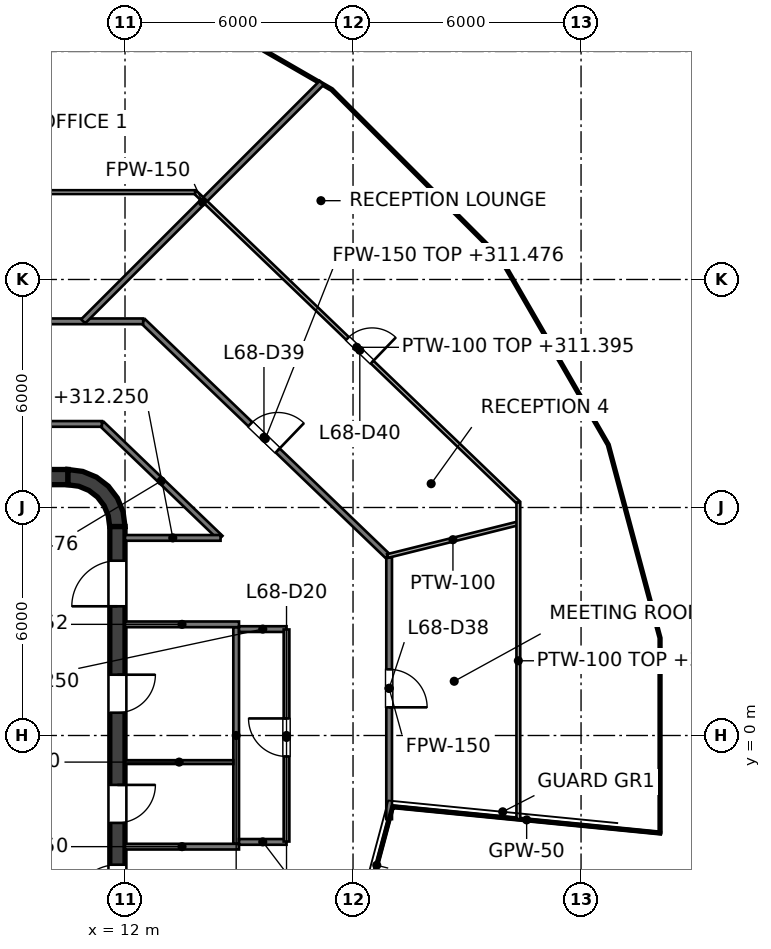
"""IFC4 building model, lengths in metres.
Left out: names, types, materials, properties, quantities, classifications, styles, units other than length and angle.
Written with IfcOpenShell. Run it as: python <this file> out.ifc"""

import sys

from ifc_helpers import new_model, si_unit, direction, frame, frame_2d, origin, place, context, subcontext, project, spatial, polyline, rectangle, outline, extrude, element, fill, save


model = new_model("IFC4")
c1 = context("Model", 3, precision=1e-05, world=origin(), true_north=direction((0.0, 1.0)))
c2 = subcontext(c1, "Body", "Model", "MODEL_VIEW")
j1 = project(units=[si_unit("LENGTHUNIT", "METRE"), si_unit("PLANEANGLEUNIT", "RADIAN")], contexts=[c1])
p1 = place(None, origin())
s1 = spatial("IfcSite", under=j1, at=p1, CompositionType="ELEMENT")
p2 = place(p1, origin())
s2 = spatial("IfcBuilding", under=s1, at=p2, CompositionType="ELEMENT")
p3 = place(p2, frame((0.0, 0.0, 308.4)))
s3 = spatial("IfcBuildingStorey", under=s2, at=p3, CompositionType="ELEMENT", Elevation=308.4)
p4 = place(p3, frame((-10.5, 6.8, 0.0), z_axis=(0.0, 0.0, 1.0), x_axis=(1.0, 0.0, 0.0)))
e1 = element("IfcWall", 1, at=p4, inside=s3, PredefinedType="SHEAR", context=c2, shape_type="SweptSolid", body=[
    extrude(rectangle(XDim=21.0, YDim=0.4, at=frame_2d((10.5, 0.0))), origin(), (0.0, 0.0, 1.0), 4.0),
])
p5 = place(p3, frame((11.8, -5.5, 0.0), z_axis=(0.0, 0.0, 1.0), x_axis=(0.0, 1.0, 0.0)))
e2 = element("IfcWall", 2, at=p5, inside=s3, PredefinedType="SHEAR", context=c2, shape_type="SweptSolid", body=[
    extrude(rectangle(XDim=11.0, YDim=0.4, at=frame_2d((5.5, 0.0))), origin(), (0.0, 0.0, 1.0), 4.0),
])
p6 = place(p5, frame((3.2, 0.0, 0.0)))
e3 = element("IfcOpeningElement", 3, at=p6, cuts=e2, PredefinedType="OPENING", context=c2, shape_type="SweptSolid", body=[
    extrude(rectangle(XDim=1.0, YDim=2.1, at=frame_2d((0.5, 1.05))), frame((0.0, 0.2, 0.0), z_axis=(0.0, -1.0, 0.0), x_axis=(1.0, 0.0, 0.0)), (0.0, 0.0, 1.0), 0.4),
])
p7 = place(p5, frame((6.1, 0.0, 0.0)))
e4 = element("IfcOpeningElement", 4, at=p7, cuts=e2, PredefinedType="OPENING", context=c2, shape_type="SweptSolid", body=[
    extrude(rectangle(XDim=1.0, YDim=2.1, at=frame_2d((0.5, 1.05))), frame((0.0, 0.2, 0.0), z_axis=(0.0, -1.0, 0.0), x_axis=(1.0, 0.0, 0.0)), (0.0, 0.0, 1.0), 0.4),
])
p8 = place(p5, frame((0.9, 0.0, 0.0)))
e5 = element("IfcOpeningElement", 5, at=p8, cuts=e2, PredefinedType="OPENING", context=c2, shape_type="SweptSolid", body=[
    extrude(rectangle(XDim=1.2, YDim=2.1, at=frame_2d((0.6, 1.05))), frame((0.0, 0.2, 0.0), z_axis=(0.0, -1.0, 0.0), x_axis=(1.0, 0.0, 0.0)), (0.0, 0.0, 1.0), 0.4),
])
p9 = place(p5, frame((8.9, 0.0, 0.0)))
e6 = element("IfcOpeningElement", 6, at=p9, cuts=e2, PredefinedType="OPENING", context=c2, shape_type="SweptSolid", body=[
    extrude(rectangle(XDim=1.2, YDim=2.1, at=frame_2d((0.6, 1.05))), frame((0.0, 0.2, 0.0), z_axis=(0.0, -1.0, 0.0), x_axis=(1.0, 0.0, 0.0)), (0.0, 0.0, 1.0), 0.4),
])
p10 = place(p3, origin())
e7 = element("IfcWall", 7, at=p10, inside=s3, PredefinedType="SHEAR", context=c2, shape_type="SweptSolid", body=[
    extrude(outline(polyline([(10.5, 7.0), (10.5, 6.596), (10.784, 6.559), (11.048, 6.45), (11.275, 6.275), (11.45, 6.048), (11.559, 5.784), (11.596, 5.5), (12.0, 5.5), (11.949, 5.888), (11.799, 6.25), (11.561, 6.561), (11.25, 6.799), (10.888, 6.949), (10.5, 7.0)])), origin(), (0.0, 0.0, 1.0), 4.0),
])
p11 = place(p3, frame((14.925, -2.85, 0.0), z_axis=(0.0, 0.0, 1.0), x_axis=(0.0, 1.0, 0.0)))
e8 = element("IfcWall", 8, at=p11, inside=s3, PredefinedType="PARTITIONING", context=c2, shape_type="SweptSolid", body=[
    extrude(rectangle(XDim=5.7, YDim=0.15, at=frame_2d((2.85, 0.0))), origin(), (0.0, 0.0, 1.0), 2.995),
])
p12 = place(p3, frame((12.0, 2.925, 0.0), z_axis=(0.0, 0.0, 1.0), x_axis=(1.0, 0.0, 0.0)))
e9 = element("IfcWall", 9, at=p12, inside=s3, PredefinedType="PARTITIONING", context=c2, shape_type="SweptSolid", body=[
    extrude(rectangle(XDim=3.0, YDim=0.15, at=frame_2d((1.5, 0.0))), origin(), (0.0, 0.0, 1.0), 3.152),
])
p13 = place(p3, frame((12.0, -2.925, 0.0), z_axis=(0.0, 0.0, 1.0), x_axis=(1.0, 0.0, 0.0)))
e10 = element("IfcWall", 10, at=p13, inside=s3, PredefinedType="PARTITIONING", context=c2, shape_type="SweptSolid", body=[
    extrude(rectangle(XDim=3.0, YDim=0.15, at=frame_2d((1.5, 0.0))), origin(), (0.0, 0.0, 1.0), 3.85),
])
p14 = place(p3, frame((12.0, -0.7, 0.0), z_axis=(0.0, 0.0, 1.0), x_axis=(1.0, 0.0, 0.0)))
e11 = element("IfcWall", 11, at=p14, inside=s3, PredefinedType="PARTITIONING", context=c2, shape_type="SweptSolid", body=[
    extrude(rectangle(XDim=2.85, YDim=0.1, at=frame_2d((1.425, 0.0))), origin(), (0.0, 0.0, 1.0), 3.85),
])
p15 = place(p3, frame((11.391, 8.199, 0.0), z_axis=(0.0, 0.0, 1.0), x_axis=(0.721228427004, -0.692697304803, 0.0)))
e12 = element("IfcWall", 12, at=p15, inside=s3, PredefinedType="PARTITIONING", context=c2, shape_type="SweptSolid", body=[
    extrude(rectangle(XDim=4.33, YDim=0.15, at=frame_2d((2.165, 0.0))), origin(), (0.0, 0.0, 1.0), 3.076),
])
p16 = place(p3, frame((12.478, 10.899, 0.0), z_axis=(0.0, 0.0, 1.0), x_axis=(0.72124338483, -0.692681730551, 0.0)))
e13 = element("IfcWall", 13, at=p16, inside=s3, PredefinedType="PARTITIONING", context=c2, shape_type="SweptSolid", body=[
    extrude(rectangle(XDim=8.915, YDim=0.15, at=frame_2d((4.458, 0.0))), origin(), (0.0, 0.0, 1.0), 3.076),
])
p17 = place(p16, frame((3.907, 0.0, 0.0)))
e14 = element("IfcOpeningElement", 14, at=p17, cuts=e13, PredefinedType="OPENING", context=c2, shape_type="SweptSolid", body=[
    extrude(rectangle(XDim=1.0, YDim=2.1, at=frame_2d((0.5, 1.05))), frame((0.0, 0.075, 0.0), z_axis=(0.0, -1.0, 0.0), x_axis=(1.0, 0.0, 0.0)), (0.0, 0.0, 1.0), 0.15),
])
for number, where, z_axis, x_axis in (
    (15, (15.0, -2.8, 0.0), (0.0, 0.0, 1.0), (1.0, 0.0, 0.0)),
    (16, (15.0, 2.8, 0.0), (0.0, 0.0, 1.0), (1.0, 0.0, 0.0)),
):
    element("IfcWall", number, at=place(p3, frame(where, z_axis=z_axis, x_axis=x_axis)), inside=s3, PredefinedType="PARTITIONING", context=c2, shape_type="SweptSolid", body=[
        extrude(rectangle(XDim=1.25, YDim=0.15, at=frame_2d((0.625, 0.0))), origin(), (0.0, 0.0, 1.0), 3.85),
    ])
p18 = place(p3, frame((12.0, 5.2, 0.0), z_axis=(0.0, 0.0, 1.0), x_axis=(1.0, 0.0, 0.0)))
e17 = element("IfcWall", 17, at=p18, inside=s3, PredefinedType="PARTITIONING", context=c2, shape_type="SweptSolid", body=[
    extrude(rectangle(XDim=2.514, YDim=0.15, at=frame_2d((1.257, 0.0))), origin(), (0.0, 0.0, 1.0), 3.85),
])
p19 = place(p3, frame((-11.391, 8.199, 0.0), z_axis=(0.0, 0.0, 1.0), x_axis=(1.0, 0.0, 0.0)))
e18 = element("IfcWall", 18, at=p19, inside=s3, PredefinedType="PARTITIONING", context=c2, shape_type="SweptSolid", body=[
    extrude(rectangle(XDim=22.782, YDim=0.15, at=frame_2d((11.391, 0.0))), origin(), (0.0, 0.0, 1.0), 2.927),
])
p20 = place(p19, frame((16.536, 0.0, 0.0)))
e19 = element("IfcOpeningElement", 19, at=p20, cuts=e18, PredefinedType="OPENING", context=c2, shape_type="SweptSolid", body=[
    extrude(rectangle(XDim=1.0, YDim=2.1, at=frame_2d((0.5, 1.05))), frame((0.0, 0.075, 0.0), z_axis=(0.0, -1.0, 0.0), x_axis=(1.0, 0.0, 0.0)), (0.0, 0.0, 1.0), 0.15),
])
p21 = place(p19, frame((5.145, 0.0, 0.0)))
e20 = element("IfcOpeningElement", 20, at=p21, cuts=e18, PredefinedType="OPENING", context=c2, shape_type="SweptSolid", body=[
    extrude(rectangle(XDim=1.0, YDim=2.1, at=frame_2d((0.5, 1.05))), frame((0.0, 0.075, 0.0), z_axis=(0.0, -1.0, 0.0), x_axis=(1.0, 0.0, 0.0)), (0.0, 0.0, 1.0), 0.15),
])
p22 = place(p3, frame((-12.478, 10.899, 0.0), z_axis=(0.0, 0.0, 1.0), x_axis=(1.0, 0.0, 0.0)))
e21 = element("IfcWall", 21, at=p22, inside=s3, PredefinedType="PARTITIONING", context=c2, shape_type="SweptSolid", body=[
    extrude(rectangle(XDim=24.956, YDim=0.15, at=frame_2d((12.478, 0.0))), origin(), (0.0, 0.0, 1.0), 2.927),
])
p23 = place(p22, frame((19.856, 0.0, 0.0)))
e22 = element("IfcOpeningElement", 22, at=p23, cuts=e21, PredefinedType="OPENING", context=c2, shape_type="SweptSolid", body=[
    extrude(rectangle(XDim=1.0, YDim=2.1, at=frame_2d((0.5, 1.05))), frame((0.0, 0.075, 0.0), z_axis=(0.0, -1.0, 0.0), x_axis=(1.0, 0.0, 0.0)), (0.0, 0.0, 1.0), 0.15),
])
p24 = place(p22, frame((14.508, 0.0, 0.0)))
e23 = element("IfcOpeningElement", 23, at=p24, cuts=e21, PredefinedType="OPENING", context=c2, shape_type="SweptSolid", body=[
    extrude(rectangle(XDim=1.0, YDim=2.1, at=frame_2d((0.5, 1.05))), frame((0.0, 0.075, 0.0), z_axis=(0.0, -1.0, 0.0), x_axis=(1.0, 0.0, 0.0)), (0.0, 0.0, 1.0), 0.15),
])
p25 = place(p22, frame((9.085, 0.0, 0.0)))
e24 = element("IfcOpeningElement", 24, at=p25, cuts=e21, PredefinedType="OPENING", context=c2, shape_type="SweptSolid", body=[
    extrude(rectangle(XDim=1.0, YDim=2.1, at=frame_2d((0.5, 1.05))), frame((0.0, 0.075, 0.0), z_axis=(0.0, -1.0, 0.0), x_axis=(1.0, 0.0, 0.0)), (0.0, 0.0, 1.0), 0.15),
])
p26 = place(p22, frame((4.343, 0.0, 0.0)))
e25 = element("IfcOpeningElement", 25, at=p26, cuts=e21, PredefinedType="OPENING", context=c2, shape_type="SweptSolid", body=[
    extrude(rectangle(XDim=1.0, YDim=2.1, at=frame_2d((0.5, 1.05))), frame((0.0, 0.075, 0.0), z_axis=(0.0, -1.0, 0.0), x_axis=(1.0, 0.0, 0.0)), (0.0, 0.0, 1.0), 0.15),
])
p27 = place(p3, frame((10.899, 10.899, 0.0), z_axis=(0.0, 0.0, 1.0), x_axis=(0.707106781187, 0.707106781187, 0.0)))
e26 = element("IfcWall", 26, at=p27, inside=s3, PredefinedType="PARTITIONING", context=c2, shape_type="SweptSolid", body=[
    extrude(rectangle(XDim=8.875, YDim=0.15, at=frame_2d((4.437, 0.0))), origin(), (0.0, 0.0, 1.0), 2.995),
])
p28 = place(p3, frame((18.95, -2.201, 0.0), z_axis=(0.0, 0.0, 1.0), x_axis=(0.0, 1.0, 0.0)))
e27 = element("IfcWall", 27, at=p28, inside=s3, PredefinedType="PARTITIONING", context=c2, shape_type="SweptSolid", body=[
    extrude(rectangle(XDim=6.884, YDim=0.15, at=frame_2d((3.442, 0.0))), origin(), (0.0, 0.0, 1.0), 2.995),
])
p29 = place(p28, frame((2.942, 0.0, 0.0)))
e28 = element("IfcOpeningElement", 28, at=p29, cuts=e27, PredefinedType="OPENING", context=c2, shape_type="SweptSolid", body=[
    extrude(rectangle(XDim=1.0, YDim=2.1, at=frame_2d((0.5, 1.05))), frame((0.0, 0.075, 0.0), z_axis=(0.0, -1.0, 0.0), x_axis=(1.0, 0.0, 0.0)), (0.0, 0.0, 1.0), 0.15),
])
p30 = place(p3, frame((16.25, -2.79, 0.0), z_axis=(0.0, 0.0, 1.0), x_axis=(0.0, 1.0, 0.0)))
e29 = element("IfcWall", 29, at=p30, inside=s3, PredefinedType="PARTITIONING", context=c2, shape_type="SweptSolid", body=[
    extrude(rectangle(XDim=5.58, YDim=0.15, at=frame_2d((2.79, 0.0))), origin(), (0.0, 0.0, 1.0), 2.995),
])
p31 = place(p30, frame((2.239, 0.0, 0.0)))
e30 = element("IfcOpeningElement", 30, at=p31, cuts=e29, PredefinedType="OPENING", context=c2, shape_type="SweptSolid", body=[
    extrude(rectangle(XDim=1.0, YDim=2.1, at=frame_2d((0.5, 1.05))), frame((0.0, 0.075, 0.0), z_axis=(0.0, -1.0, 0.0), x_axis=(1.0, 0.0, 0.0)), (0.0, 0.0, 1.0), 0.15),
])
p32 = place(p3, frame((19.038, -1.873, 0.0), z_axis=(0.0, 0.0, 1.0), x_axis=(0.995189989424, -0.097963691995, 0.0)))
e31 = element("IfcWall", 31, at=p32, inside=s3, PredefinedType="PARTITIONING", context=c2, shape_type="SweptSolid", body=[
    extrude(rectangle(XDim=7.095, YDim=0.05, at=frame_2d((3.548, 0.0))), origin(), (0.0, 0.0, 1.0), 2.995),
])
p33 = place(p3, frame((18.212, -4.956, 0.0), z_axis=(0.0, 0.0, 1.0), x_axis=(0.258862263765, 0.965914244847, 0.0)))
e32 = element("IfcWall", 32, at=p33, inside=s3, PredefinedType="PARTITIONING", context=c2, shape_type="SweptSolid", body=[
    extrude(rectangle(XDim=3.192, YDim=0.05, at=frame_2d((1.596, 0.0))), origin(), (0.0, 0.0, 1.0), 2.995),
])
p34 = place(p3, frame((13.846, 14.299, 0.0), z_axis=(0.0, 0.0, 1.0), x_axis=(0.72117874289, -0.692749031615, 0.0)))
e33 = element("IfcWall", 33, at=p34, inside=s3, PredefinedType="PARTITIONING", context=c2, shape_type="SweptSolid", body=[
    extrude(rectangle(XDim=11.791, YDim=0.1, at=frame_2d((5.896, 0.0))), origin(), (0.0, 0.0, 1.0), 2.995),
])
p35 = place(p34, frame((5.557, 0.0, 0.0)))
e34 = element("IfcOpeningElement", 34, at=p35, cuts=e33, PredefinedType="OPENING", context=c2, shape_type="SweptSolid", body=[
    extrude(rectangle(XDim=0.9, YDim=2.1, at=frame_2d((0.45, 1.05))), frame((0.0, 0.05, 0.0), z_axis=(0.0, -1.0, 0.0), x_axis=(1.0, 0.0, 0.0)), (0.0, 0.0, 1.0), 0.1),
])
p36 = place(p3, frame((-13.846, 14.299, 0.0), z_axis=(0.0, 0.0, 1.0), x_axis=(1.0, 0.0, 0.0)))
e35 = element("IfcWall", 35, at=p36, inside=s3, PredefinedType="PARTITIONING", context=c2, shape_type="SweptSolid", body=[
    extrude(rectangle(XDim=27.692, YDim=0.1, at=frame_2d((13.846, 0.0))), origin(), (0.0, 0.0, 1.0), 2.927),
])
p37 = place(p36, frame((9.035, 0.0, 0.0)))
e36 = element("IfcOpeningElement", 36, at=p37, cuts=e35, PredefinedType="OPENING", context=c2, shape_type="SweptSolid", body=[
    extrude(rectangle(XDim=1.8, YDim=2.1, at=frame_2d((0.9, 1.05))), frame((0.0, 0.05, 0.0), z_axis=(0.0, -1.0, 0.0), x_axis=(1.0, 0.0, 0.0)), (0.0, 0.0, 1.0), 0.1),
])
p38 = place(p3, frame((18.908, 4.723, 0.0), z_axis=(0.0, 0.0, 1.0), x_axis=(0.970170827599, 0.242422287086, 0.0)))
e37 = element("IfcWall", 37, at=p38, inside=s3, PredefinedType="PARTITIONING", context=c2, shape_type="SweptSolid", body=[
    extrude(rectangle(XDim=3.548, YDim=0.1, at=frame_2d((1.774, 0.0))), origin(), (0.0, 0.0, 1.0), 3.85),
])
p39 = place(p3, frame((22.35, -2.199, 0.0), z_axis=(0.0, 0.0, 1.0), x_axis=(0.0, 1.0, 0.0)))
e38 = element("IfcWall", 38, at=p39, inside=s3, PredefinedType="PARTITIONING", context=c2, shape_type="SweptSolid", body=[
    extrude(rectangle(XDim=8.331, YDim=0.1, at=frame_2d((4.166, 0.0))), origin(), (0.0, 0.0, 1.0), 2.995),
])
p40 = place(p6, origin())
e39 = element("IfcDoor", 39, at=p40, inside=s3, OperationType="SINGLE_SWING_RIGHT", PredefinedType="DOOR", context=c2, shape_type="SweptSolid", body=[
    extrude(rectangle(XDim=1.0, YDim=2.1, at=frame_2d((0.5, 1.05))), frame((0.0, 0.025, 0.0), z_axis=(0.0, -1.0, 0.0), x_axis=(1.0, 0.0, 0.0)), (0.0, 0.0, 1.0), 0.05),
])
fill(e3, e39)
p41 = place(p7, origin())
e40 = element("IfcDoor", 40, at=p41, inside=s3, OperationType="SINGLE_SWING_RIGHT", PredefinedType="DOOR", context=c2, shape_type="SweptSolid", body=[
    extrude(rectangle(XDim=1.0, YDim=2.1, at=frame_2d((0.5, 1.05))), frame((0.0, 0.025, 0.0), z_axis=(0.0, -1.0, 0.0), x_axis=(1.0, 0.0, 0.0)), (0.0, 0.0, 1.0), 0.05),
])
fill(e4, e40)
p42 = place(p8, origin())
e41 = element("IfcDoor", 41, at=p42, inside=s3, OperationType="SINGLE_SWING_LEFT", PredefinedType="DOOR", context=c2, shape_type="SweptSolid", body=[
    extrude(rectangle(XDim=1.2, YDim=2.1, at=frame_2d((0.6, 1.05))), frame((0.0, 0.025, 0.0), z_axis=(0.0, -1.0, 0.0), x_axis=(1.0, 0.0, 0.0)), (0.0, 0.0, 1.0), 0.05),
])
fill(e5, e41)
p43 = place(p9, origin())
e42 = element("IfcDoor", 42, at=p43, inside=s3, OperationType="SINGLE_SWING_LEFT", PredefinedType="DOOR", context=c2, shape_type="SweptSolid", body=[
    extrude(rectangle(XDim=1.2, YDim=2.1, at=frame_2d((0.6, 1.05))), frame((0.0, 0.025, 0.0), z_axis=(0.0, -1.0, 0.0), x_axis=(1.0, 0.0, 0.0)), (0.0, 0.0, 1.0), 0.05),
])
fill(e6, e42)
p44 = place(p31, origin())
e43 = element("IfcDoor", 43, at=p44, inside=s3, OperationType="SINGLE_SWING_RIGHT", PredefinedType="DOOR", context=c2, shape_type="SweptSolid", body=[
    extrude(rectangle(XDim=1.0, YDim=2.1, at=frame_2d((0.5, 1.05))), frame((0.0, 0.025, 0.0), z_axis=(0.0, -1.0, 0.0), x_axis=(1.0, 0.0, 0.0)), (0.0, 0.0, 1.0), 0.05),
])
fill(e30, e43)
p45 = place(p29, origin())
e44 = element("IfcDoor", 44, at=p45, inside=s3, OperationType="SINGLE_SWING_LEFT", PredefinedType="DOOR", context=c2, shape_type="SweptSolid", body=[
    extrude(rectangle(XDim=1.0, YDim=2.1, at=frame_2d((0.5, 1.05))), frame((0.0, 0.025, 0.0), z_axis=(0.0, -1.0, 0.0), x_axis=(1.0, 0.0, 0.0)), (0.0, 0.0, 1.0), 0.05),
])
fill(e28, e44)
p46 = place(p17, origin())
e45 = element("IfcDoor", 45, at=p46, inside=s3, OperationType="SINGLE_SWING_RIGHT", PredefinedType="DOOR", context=c2, shape_type="SweptSolid", body=[
    extrude(rectangle(XDim=1.0, YDim=2.1, at=frame_2d((0.5, 1.05))), frame((0.0, 0.025, 0.0), z_axis=(0.0, -1.0, 0.0), x_axis=(1.0, 0.0, 0.0)), (0.0, 0.0, 1.0), 0.05),
])
fill(e14, e45)
p47 = place(p35, origin())
e46 = element("IfcDoor", 46, at=p47, inside=s3, OperationType="SINGLE_SWING_RIGHT", PredefinedType="DOOR", context=c2, shape_type="SweptSolid", body=[
    extrude(rectangle(XDim=0.9, YDim=2.1, at=frame_2d((0.45, 1.05))), frame((0.0, 0.025, 0.0), z_axis=(0.0, -1.0, 0.0), x_axis=(1.0, 0.0, 0.0)), (0.0, 0.0, 1.0), 0.05),
])
fill(e34, e46)
save(model, sys.argv[1])
